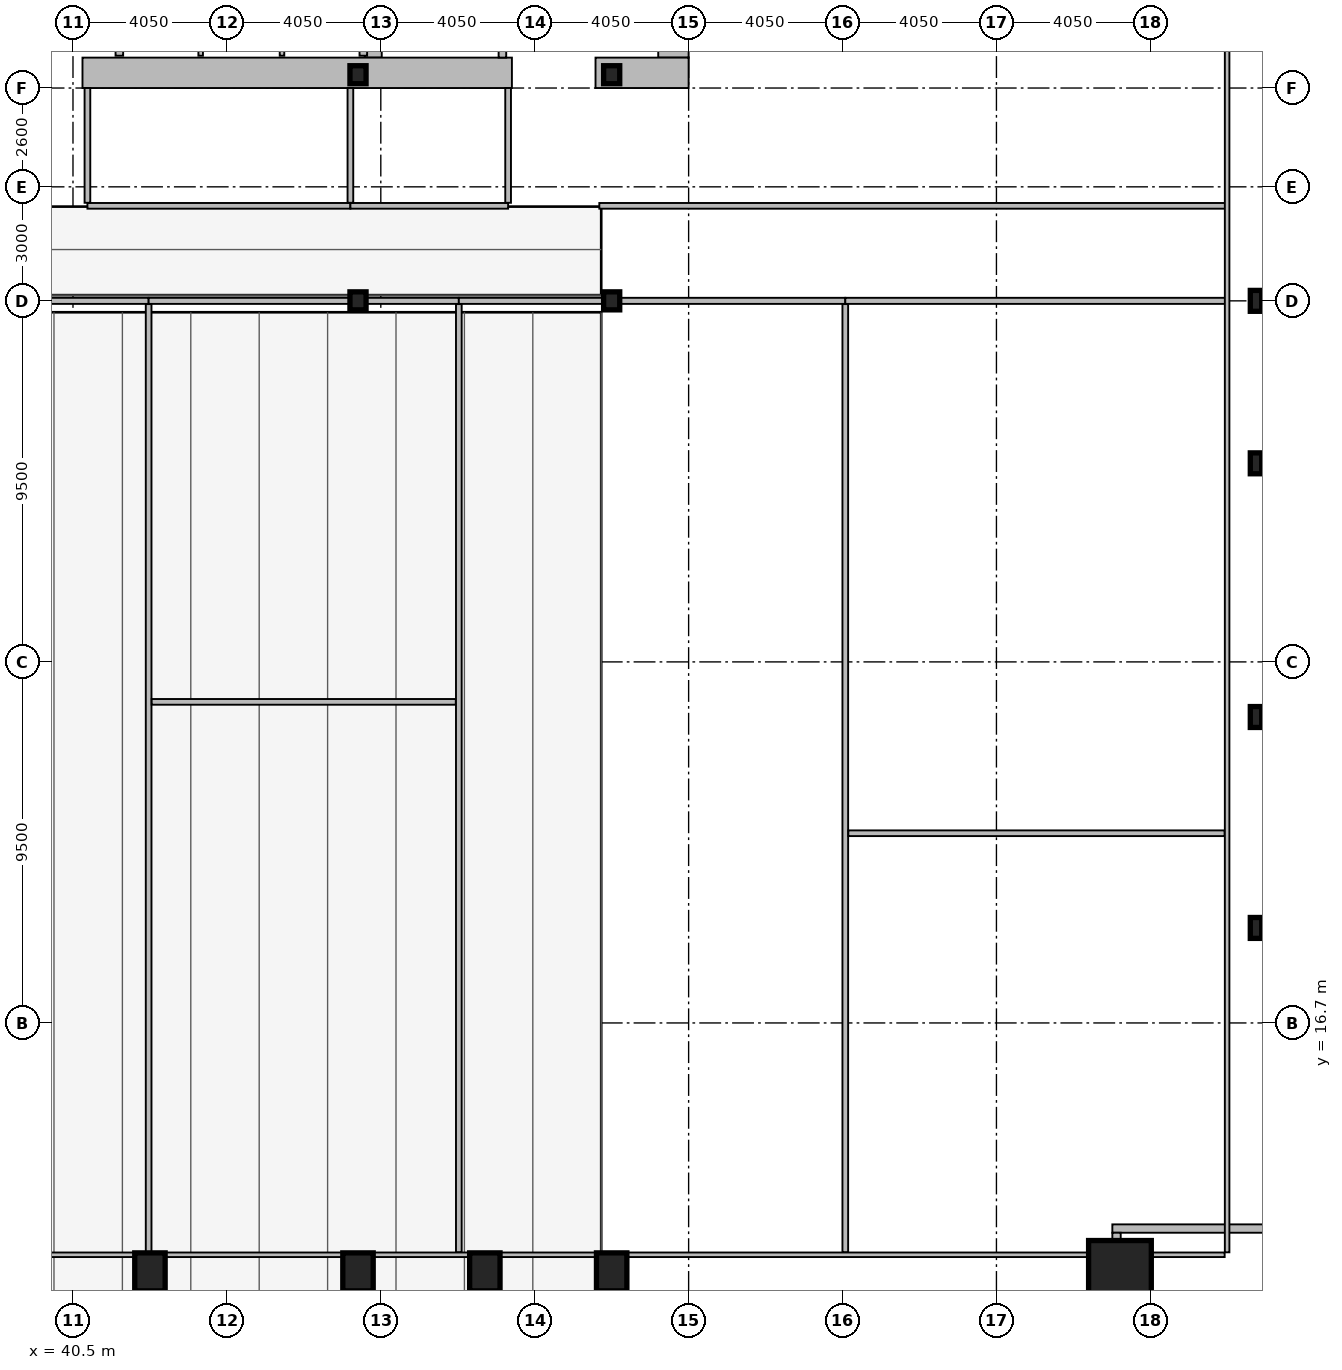
"""IFC4 building model, lengths in metres.
Left out: names, types, materials, properties, quantities, classifications, styles, units other than length and angle.
Written with IfcOpenShell. Run it as: python <this file> out.ifc"""

import sys

from ifc_helpers import new_model, si_unit, direction, frame, frame_2d, origin, origin_2d, place, context, subcontext, project, spatial, rectangle, hollow_rectangle, i_section, extrude, element, fill, save


model = new_model("IFC4")
c1 = context("Model", 3, precision=1e-05, world=origin(), true_north=direction((0.0, 1.0)))
c2 = subcontext(c1, "Body", "Model", "MODEL_VIEW")
j1 = project(units=[si_unit("LENGTHUNIT", "METRE"), si_unit("PLANEANGLEUNIT", "RADIAN")], contexts=[c1])
p1 = place(None, origin())
s1 = spatial("IfcSite", under=j1, at=p1, CompositionType="ELEMENT")
p2 = place(p1, origin())
s2 = spatial("IfcBuilding", under=s1, at=p2, CompositionType="ELEMENT")
p3 = place(p2, frame((0.0, 0.0, 61.8)))
s3 = spatial("IfcBuildingStorey", under=s2, at=p3, CompositionType="ELEMENT", Elevation=61.8)
p4 = place(p3, frame((56.3, 52.9, 0.0), z_axis=(0.0, 0.0, 1.0), x_axis=(0.0, -1.0, 0.0)))
e1 = element("IfcWall", 1, at=p4, inside=s3, PredefinedType="SHEAR", context=c2, shape_type="SweptSolid", body=[
    extrude(rectangle(XDim=10.8, YDim=0.8, at=frame_2d((5.4, 0.0))), origin(), (0.0, 0.0, 1.0), 3.82),
])
p5 = place(p3, frame((48.4, 42.1, 0.0), z_axis=(0.0, 0.0, 1.0), x_axis=(0.0, 1.0, 0.0)))
e2 = element("IfcWall", 2, at=p5, inside=s3, PredefinedType="SHEAR", context=c2, shape_type="SweptSolid", body=[
    extrude(rectangle(XDim=10.8, YDim=0.45, at=frame_2d((5.4, 0.0))), origin(), (0.0, 0.0, 1.0), 3.82),
])
p6 = place(p3, frame((52.05, 41.7, 0.0), z_axis=(0.0, 0.0, 1.0), x_axis=(-1.0, 0.0, 0.0)))
e3 = element("IfcWall", 3, at=p6, inside=s3, PredefinedType="SHEAR", context=c2, shape_type="SweptSolid", body=[
    extrude(rectangle(XDim=11.3, YDim=0.8, at=frame_2d((5.65, 0.0))), origin(), (0.0, 0.0, 1.0), 3.82),
])
p7 = place(p3, frame((56.7, 41.7, 0.0), z_axis=(0.0, 0.0, 1.0), x_axis=(-1.0, 0.0, 0.0)))
e4 = element("IfcWall", 4, at=p7, inside=s3, PredefinedType="SHEAR", context=c2, shape_type="SweptSolid", body=[
    extrude(rectangle(XDim=2.45, YDim=0.8, at=frame_2d((1.225, 0.0))), origin(), (0.0, 0.0, 1.0), 3.82),
])
p8 = place(p3, frame((68.05, 10.15, 0.0), z_axis=(0.0, 0.0, 1.0), x_axis=(1.0, 0.0, 0.0)))
e5 = element("IfcColumn", 5, at=p8, inside=s3, PredefinedType="COLUMN", context=c2, shape_type="SweptSolid", body=[
    extrude(hollow_rectangle(XDim=1.65, YDim=1.65, WallThickness=0.075, at=origin_2d()), origin(), (0.0, 0.0, 1.0), 4.0),
])
for number, where, z_axis, x_axis in (
    (6, (42.525, 10.15, 0.0), (0.0, 0.0, 1.0), (1.0, 0.0, 0.0)),
    (7, (48.0, 10.15, 0.0), (0.0, 0.0, 1.0), (1.0, 0.0, 0.0)),
    (8, (51.337, 10.15, 0.0), (0.0, 0.0, 1.0), (1.0, 0.0, 0.0)),
    (9, (54.675, 10.15, 0.0), (0.0, 0.0, 1.0), (1.0, 0.0, 0.0)),
):
    element("IfcColumn", number, at=place(p3, frame(where, z_axis=z_axis, x_axis=x_axis)), inside=s3, PredefinedType="COLUMN", context=c2, shape_type="SweptSolid", body=[
        extrude(hollow_rectangle(XDim=0.8, YDim=1.0, WallThickness=0.055, at=origin_2d()), origin(), (0.0, 0.0, 1.0), 4.0),
    ])
for number, where, z_axis, x_axis in (
    (10, (71.63, 19.2, 0.0), (0.0, 0.0, 1.0), (1.0, 0.0, 0.0)),
    (11, (71.63, 24.75, 0.0), (0.0, 0.0, 1.0), (1.0, 0.0, 0.0)),
    (12, (71.63, 31.425, 0.0), (0.0, 0.0, 1.0), (1.0, 0.0, 0.0)),
    (13, (71.63, 35.7, 0.0), (0.0, 0.0, 1.0), (1.0, 0.0, 0.0)),
):
    element("IfcColumn", number, at=place(p3, frame(where, z_axis=z_axis, x_axis=x_axis)), inside=s3, PredefinedType="COLUMN", context=c2, shape_type="SweptSolid", body=[
        extrude(i_section(OverallWidth=0.3, OverallDepth=0.55, WebThickness=0.015, FlangeThickness=0.029, at=origin_2d()), origin(), (0.0, 0.0, 1.0), 4.0),
    ])
for number, where, z_axis, x_axis in (
    (14, (48.0, 35.7, 0.0), (0.0, 0.0, 1.0), (1.0, 0.0, 0.0)),
    (15, (48.0, 41.65, 0.0), (0.0, 0.0, 1.0), (1.0, 0.0, 0.0)),
    (16, (54.675, 35.7, 0.0), (0.0, 0.0, 1.0), (1.0, 0.0, 0.0)),
    (17, (54.675, 41.65, 0.0), (0.0, 0.0, 1.0), (1.0, 0.0, 0.0)),
):
    element("IfcColumn", number, at=place(p3, frame(where, z_axis=z_axis, x_axis=x_axis)), inside=s3, PredefinedType="COLUMN", context=c2, shape_type="SweptSolid", body=[
        extrude(i_section(OverallWidth=0.424, OverallDepth=0.474, WebThickness=0.048, FlangeThickness=0.077, at=origin_2d()), origin(), (0.0, 0.0, 1.0), 4.0),
    ])
p9 = place(p3, frame((72.07, 11.29, 0.0), z_axis=(0.0, 0.0, 1.0), x_axis=(-1.0, 0.0, 0.0)))
e18 = element("IfcWall", 18, at=p9, inside=s3, PredefinedType="SOLIDWALL", context=c2, shape_type="SweptSolid", body=[
    extrude(rectangle(XDim=4.22, YDim=0.22, at=frame_2d((2.11, 0.0))), origin(), (0.0, 0.0, 1.0), 3.16),
])
p10 = place(p3, frame((67.96, 11.18, 0.0), z_axis=(0.0, 0.0, 1.0), x_axis=(0.0, -1.0, 0.0)))
e19 = element("IfcWall", 19, at=p10, inside=s3, PredefinedType="SOLIDWALL", context=c2, shape_type="SweptSolid", body=[
    extrude(rectangle(XDim=3.91, YDim=0.22, at=frame_2d((1.955, 0.0))), origin(), (0.0, 0.0, 1.0), 3.16),
])
p11 = place(p3, frame((51.8, 42.1, 0.0), z_axis=(0.0, 0.0, 1.0), x_axis=(0.0, 1.0, 0.0)))
e20 = element("IfcWall", 20, at=p11, inside=s3, PredefinedType="PARTITIONING", context=c2, shape_type="SweptSolid", body=[
    extrude(rectangle(XDim=2.395, YDim=0.2, at=frame_2d((1.198, 0.0))), origin(), (0.0, 0.0, 1.0), 3.82),
])
p12 = place(p11, frame((0.38, 0.0, 0.0)))
e21 = element("IfcOpeningElement", 21, at=p12, cuts=e20, PredefinedType="OPENING", context=c2, shape_type="SweptSolid", body=[
    extrude(rectangle(XDim=1.05, YDim=2.15, at=frame_2d((0.525, 1.075))), frame((0.0, 0.11, 0.0), z_axis=(0.0, -1.0, 0.0), x_axis=(1.0, 0.0, 0.0)), (0.0, 0.0, 1.0), 0.22),
])
for number, where, z_axis, x_axis in (
    (22, (41.72, 42.15, 0.0), (0.0, 0.0, 1.0), (0.0, 1.0, 0.0)),
    (23, (48.14, 42.15, 0.0), (0.0, 0.0, 1.0), (0.0, 1.0, 0.0)),
):
    element("IfcWall", number, at=place(p3, frame(where, z_axis=z_axis, x_axis=x_axis)), inside=s3, PredefinedType="PARTITIONING", context=c2, shape_type="SweptSolid", body=[
        extrude(rectangle(XDim=2.095, YDim=0.2, at=frame_2d((1.048, 0.0))), origin(), (0.0, 0.0, 1.0), 3.82),
    ])
for number, where, z_axis, x_axis in (
    (24, (43.86, 42.15, 0.0), (0.0, 0.0, 1.0), (0.0, 1.0, 0.0)),
    (25, (46.0, 42.15, 0.0), (0.0, 0.0, 1.0), (0.0, 1.0, 0.0)),
):
    element("IfcWall", number, at=place(p3, frame(where, z_axis=z_axis, x_axis=x_axis)), inside=s3, PredefinedType="PARTITIONING", context=c2, shape_type="SweptSolid", body=[
        extrude(rectangle(XDim=2.095, YDim=0.12, at=frame_2d((1.048, 0.0))), origin(), (0.0, 0.0, 1.0), 3.82),
    ])
p13 = place(p3, frame((40.88, 38.2, 0.0), z_axis=(0.0, 0.0, 1.0), x_axis=(1.0, 0.0, 0.0)))
e26 = element("IfcWall", 26, at=p13, inside=s3, PredefinedType="PARTITIONING", context=c2, shape_type="SweptSolid", body=[
    extrude(rectangle(XDim=6.92, YDim=0.15, at=frame_2d((3.46, 0.0))), origin(), (0.0, 0.0, 1.0), 3.01),
])
p14 = place(p13, frame((1.1, 0.0, 0.0)))
e27 = element("IfcOpeningElement", 27, at=p14, cuts=e26, PredefinedType="OPENING", context=c2, shape_type="SweptSolid", body=[
    extrude(rectangle(XDim=0.9, YDim=2.05, at=frame_2d((0.45, 1.025))), frame((0.0, 0.085, 0.0), z_axis=(0.0, -1.0, 0.0), x_axis=(1.0, 0.0, 0.0)), (0.0, 0.0, 1.0), 0.17),
])
p15 = place(p3, frame((47.8, 38.2, 0.0), z_axis=(0.0, 0.0, 1.0), x_axis=(1.0, 0.0, 0.0)))
e28 = element("IfcWall", 28, at=p15, inside=s3, PredefinedType="PARTITIONING", context=c2, shape_type="SweptSolid", body=[
    extrude(rectangle(XDim=4.15, YDim=0.15, at=frame_2d((2.075, 0.0))), origin(), (0.0, 0.0, 1.0), 3.01),
])
p16 = place(p15, frame((1.1, 0.0, 0.0)))
e29 = element("IfcOpeningElement", 29, at=p16, cuts=e28, PredefinedType="OPENING", context=c2, shape_type="SweptSolid", body=[
    extrude(rectangle(XDim=1.0, YDim=2.05, at=frame_2d((0.5, 1.025))), frame((0.0, 0.085, 0.0), z_axis=(0.0, -1.0, 0.0), x_axis=(1.0, 0.0, 0.0)), (0.0, 0.0, 1.0), 0.17),
])
p17 = place(p3, frame((40.88, 38.28, 0.0), z_axis=(0.0, 0.0, 1.0), x_axis=(0.0, 1.0, 0.0)))
e30 = element("IfcWall", 30, at=p17, inside=s3, PredefinedType="PARTITIONING", context=c2, shape_type="SweptSolid", body=[
    extrude(rectangle(XDim=3.02, YDim=0.15, at=frame_2d((1.51, 0.0))), origin(), (0.0, 0.0, 1.0), 3.82),
])
p18 = place(p3, frame((47.8, 38.28, 0.0), z_axis=(0.0, 0.0, 1.0), x_axis=(0.0, 1.0, 0.0)))
e31 = element("IfcWall", 31, at=p18, inside=s3, PredefinedType="PARTITIONING", context=c2, shape_type="SweptSolid", body=[
    extrude(rectangle(XDim=3.02, YDim=0.15, at=frame_2d((1.51, 0.0))), origin(), (0.0, 0.0, 1.0), 3.01),
])
p19 = place(p3, frame((51.95, 38.28, 0.0), z_axis=(0.0, 0.0, 1.0), x_axis=(0.0, 1.0, 0.0)))
e32 = element("IfcWall", 32, at=p19, inside=s3, PredefinedType="PARTITIONING", context=c2, shape_type="SweptSolid", body=[
    extrude(rectangle(XDim=3.02, YDim=0.15, at=frame_2d((1.51, 0.0))), origin(), (0.0, 0.0, 1.0), 3.82),
])
p20 = place(p3, frame((54.35, 38.2, 0.0), z_axis=(0.0, 0.0, 1.0), x_axis=(1.0, 0.0, 0.0)))
e33 = element("IfcWall", 33, at=p20, inside=s3, PredefinedType="PARTITIONING", context=c2, shape_type="SweptSolid", body=[
    extrude(rectangle(XDim=16.52, YDim=0.15, at=frame_2d((8.26, 0.0))), origin(), (0.0, 0.0, 1.0), 3.01),
])
p21 = place(p20, frame((3.25, 0.0, 0.0)))
e34 = element("IfcOpeningElement", 34, at=p21, cuts=e33, PredefinedType="OPENING", context=c2, shape_type="SweptSolid", body=[
    extrude(rectangle(XDim=0.95, YDim=2.05, at=frame_2d((0.475, 1.025))), frame((0.0, 0.085, 0.0), z_axis=(0.0, -1.0, 0.0), x_axis=(1.0, 0.0, 0.0)), (0.0, 0.0, 1.0), 0.17),
])
p22 = place(p3, frame((34.68, 35.7, 0.0), z_axis=(0.0, 0.0, 1.0), x_axis=(1.0, 0.0, 0.0)))
e35 = element("IfcWall", 35, at=p22, inside=s3, PredefinedType="PARTITIONING", context=c2, shape_type="SweptSolid", body=[
    extrude(rectangle(XDim=7.81, YDim=0.16, at=frame_2d((3.905, 0.0))), origin(), (0.0, 0.0, 1.0), 3.01),
])
p23 = place(p22, frame((3.53, 0.0, 0.0)))
e36 = element("IfcOpeningElement", 36, at=p23, cuts=e35, PredefinedType="OPENING", context=c2, shape_type="SweptSolid", body=[
    extrude(rectangle(XDim=1.0, YDim=2.05, at=frame_2d((0.5, 1.025))), frame((0.0, 0.09, 0.0), z_axis=(0.0, -1.0, 0.0), x_axis=(1.0, 0.0, 0.0)), (0.0, 0.0, 1.0), 0.18),
])
p24 = place(p3, frame((42.49, 35.7, 0.0), z_axis=(0.0, 0.0, 1.0), x_axis=(1.0, 0.0, 0.0)))
e37 = element("IfcWall", 37, at=p24, inside=s3, PredefinedType="PARTITIONING", context=c2, shape_type="SweptSolid", body=[
    extrude(rectangle(XDim=8.163, YDim=0.16, at=frame_2d((4.082, 0.0))), origin(), (0.0, 0.0, 1.0), 3.01),
])
p25 = place(p24, frame((3.678, 0.0, 0.0)))
e38 = element("IfcOpeningElement", 38, at=p25, cuts=e37, PredefinedType="OPENING", context=c2, shape_type="SweptSolid", body=[
    extrude(rectangle(XDim=1.0, YDim=2.05, at=frame_2d((0.5, 1.025))), frame((0.0, 0.09, 0.0), z_axis=(0.0, -1.0, 0.0), x_axis=(1.0, 0.0, 0.0)), (0.0, 0.0, 1.0), 0.18),
])
p26 = place(p3, frame((42.49, 10.665, 0.0), z_axis=(0.0, 0.0, 1.0), x_axis=(0.0, 1.0, 0.0)))
e39 = element("IfcWall", 39, at=p26, inside=s3, PredefinedType="PARTITIONING", context=c2, shape_type="SweptSolid", body=[
    extrude(rectangle(XDim=24.95, YDim=0.15, at=frame_2d((12.475, 0.0))), origin(), (0.0, 0.0, 1.0), 3.01),
])
p27 = place(p3, frame((42.571, 25.148, 0.0), z_axis=(0.0, 0.0, 1.0), x_axis=(1.0, 0.0, 0.0)))
e40 = element("IfcWall", 40, at=p27, inside=s3, PredefinedType="PARTITIONING", context=c2, shape_type="SweptSolid", body=[
    extrude(rectangle(XDim=8.003, YDim=0.15, at=frame_2d((4.001, 0.0))), origin(), (0.0, 0.0, 1.0), 3.01),
])
p28 = place(p27, frame((3.673, 0.0, 0.0)))
e41 = element("IfcOpeningElement", 41, at=p28, cuts=e40, PredefinedType="OPENING", context=c2, shape_type="SweptSolid", body=[
    extrude(rectangle(XDim=0.9, YDim=2.05, at=frame_2d((0.45, 1.025))), frame((0.0, 0.085, 0.0), z_axis=(0.0, -1.0, 0.0), x_axis=(1.0, 0.0, 0.0)), (0.0, 0.0, 1.0), 0.17),
])
p29 = place(p3, frame((50.653, 35.7, 0.0), z_axis=(0.0, 0.0, 1.0), x_axis=(1.0, 0.0, 0.0)))
e42 = element("IfcWall", 42, at=p29, inside=s3, PredefinedType="PARTITIONING", context=c2, shape_type="SweptSolid", body=[
    extrude(rectangle(XDim=10.169, YDim=0.16, at=frame_2d((5.084, 0.0))), origin(), (0.0, 0.0, 1.0), 3.01),
])
p30 = place(p29, frame((4.521, 0.0, 0.0)))
e43 = element("IfcOpeningElement", 43, at=p30, cuts=e42, PredefinedType="OPENING", context=c2, shape_type="SweptSolid", body=[
    extrude(rectangle(XDim=1.0, YDim=2.05, at=frame_2d((0.5, 1.025))), frame((0.0, 0.09, 0.0), z_axis=(0.0, -1.0, 0.0), x_axis=(1.0, 0.0, 0.0)), (0.0, 0.0, 1.0), 0.18),
])
p31 = place(p3, frame((50.653, 10.665, 0.0), z_axis=(0.0, 0.0, 1.0), x_axis=(0.0, 1.0, 0.0)))
e44 = element("IfcWall", 44, at=p31, inside=s3, PredefinedType="PARTITIONING", context=c2, shape_type="SweptSolid", body=[
    extrude(rectangle(XDim=24.95, YDim=0.15, at=frame_2d((12.475, 0.0))), origin(), (0.0, 0.0, 1.0), 3.21),
])
p32 = place(p3, frame((60.823, 35.7, 0.0), z_axis=(0.0, 0.0, 1.0), x_axis=(1.0, 0.0, 0.0)))
e45 = element("IfcWall", 45, at=p32, inside=s3, PredefinedType="PARTITIONING", context=c2, shape_type="SweptSolid", body=[
    extrude(rectangle(XDim=10.048, YDim=0.16, at=frame_2d((5.024, 0.0))), origin(), (0.0, 0.0, 1.0), 3.01),
])
p33 = place(p32, frame((4.47, 0.0, 0.0)))
e46 = element("IfcOpeningElement", 46, at=p33, cuts=e45, PredefinedType="OPENING", context=c2, shape_type="SweptSolid", body=[
    extrude(rectangle(XDim=1.0, YDim=2.05, at=frame_2d((0.5, 1.025))), frame((0.0, 0.09, 0.0), z_axis=(0.0, -1.0, 0.0), x_axis=(1.0, 0.0, 0.0)), (0.0, 0.0, 1.0), 0.18),
])
p34 = place(p3, frame((60.823, 10.665, 0.0), z_axis=(0.0, 0.0, 1.0), x_axis=(0.0, 1.0, 0.0)))
e47 = element("IfcWall", 47, at=p34, inside=s3, PredefinedType="PARTITIONING", context=c2, shape_type="SweptSolid", body=[
    extrude(rectangle(XDim=24.95, YDim=0.15, at=frame_2d((12.475, 0.0))), origin(), (0.0, 0.0, 1.0), 3.01),
])
p35 = place(p3, frame((60.903, 21.692, 0.0), z_axis=(0.0, 0.0, 1.0), x_axis=(1.0, 0.0, 0.0)))
e48 = element("IfcWall", 48, at=p35, inside=s3, PredefinedType="PARTITIONING", context=c2, shape_type="SweptSolid", body=[
    extrude(rectangle(XDim=9.902, YDim=0.15, at=frame_2d((4.951, 0.0))), origin(), (0.0, 0.0, 1.0), 3.82),
])
p36 = place(p35, frame((4.521, 0.0, 0.0)))
e49 = element("IfcOpeningElement", 49, at=p36, cuts=e48, PredefinedType="OPENING", context=c2, shape_type="SweptSolid", body=[
    extrude(rectangle(XDim=0.9, YDim=2.05, at=frame_2d((0.45, 1.025))), frame((0.0, 0.085, 0.0), z_axis=(0.0, -1.0, 0.0), x_axis=(1.0, 0.0, 0.0)), (0.0, 0.0, 1.0), 0.17),
])
p37 = place(p3, frame((70.87, 10.665, 0.0), z_axis=(0.0, 0.0, 1.0), x_axis=(0.0, 1.0, 0.0)))
e50 = element("IfcWall", 50, at=p37, inside=s3, PredefinedType="PARTITIONING", context=c2, shape_type="SweptSolid", body=[
    extrude(rectangle(XDim=42.11, YDim=0.12, at=frame_2d((21.055, 0.0))), origin(), (0.0, 0.0, 1.0), 3.01),
])
p38 = place(p3, frame((2.095, 10.6, 0.0), z_axis=(0.0, 0.0, 1.0), x_axis=(1.0, 0.0, 0.0)))
e51 = element("IfcWall", 51, at=p38, inside=s3, PredefinedType="PARTITIONING", context=c2, shape_type="SweptSolid", body=[
    extrude(rectangle(XDim=68.71, YDim=0.12, at=frame_2d((34.355, 0.0))), origin(), (0.0, 0.0, 1.0), 3.01),
])
p39 = place(p14, origin())
e52 = element("IfcDoor", 52, at=p39, inside=s3, OperationType="SINGLE_SWING_LEFT", PredefinedType="DOOR", context=c2, shape_type="SweptSolid", body=[
    extrude(rectangle(XDim=0.9, YDim=2.05, at=frame_2d((0.45, 1.025))), frame((0.0, 0.025, 0.0), z_axis=(0.0, -1.0, 0.0), x_axis=(1.0, 0.0, 0.0)), (0.0, 0.0, 1.0), 0.05),
])
fill(e27, e52)
p40 = place(p16, origin())
e53 = element("IfcDoor", 53, at=p40, inside=s3, OperationType="SINGLE_SWING_RIGHT", PredefinedType="DOOR", context=c2, shape_type="SweptSolid", body=[
    extrude(rectangle(XDim=1.0, YDim=2.05, at=frame_2d((0.5, 1.025))), frame((0.0, 0.025, 0.0), z_axis=(0.0, -1.0, 0.0), x_axis=(1.0, 0.0, 0.0)), (0.0, 0.0, 1.0), 0.05),
])
fill(e29, e53)
p41 = place(p21, origin())
e54 = element("IfcDoor", 54, at=p41, inside=s3, OperationType="SINGLE_SWING_RIGHT", PredefinedType="DOOR", context=c2, shape_type="SweptSolid", body=[
    extrude(rectangle(XDim=0.95, YDim=2.05, at=frame_2d((0.475, 1.025))), frame((0.0, 0.025, 0.0), z_axis=(0.0, -1.0, 0.0), x_axis=(1.0, 0.0, 0.0)), (0.0, 0.0, 1.0), 0.05),
])
fill(e34, e54)
p42 = place(p25, origin())
e55 = element("IfcDoor", 55, at=p42, inside=s3, OperationType="SINGLE_SWING_LEFT", PredefinedType="DOOR", context=c2, shape_type="SweptSolid", body=[
    extrude(rectangle(XDim=1.0, YDim=2.05, at=frame_2d((0.5, 1.025))), frame((0.0, 0.025, 0.0), z_axis=(0.0, -1.0, 0.0), x_axis=(1.0, 0.0, 0.0)), (0.0, 0.0, 1.0), 0.05),
])
fill(e38, e55)
p43 = place(p28, origin())
e56 = element("IfcDoor", 56, at=p43, inside=s3, OperationType="SINGLE_SWING_RIGHT", PredefinedType="DOOR", context=c2, shape_type="SweptSolid", body=[
    extrude(rectangle(XDim=0.9, YDim=2.05, at=frame_2d((0.45, 1.025))), frame((0.0, 0.025, 0.0), z_axis=(0.0, -1.0, 0.0), x_axis=(1.0, 0.0, 0.0)), (0.0, 0.0, 1.0), 0.05),
])
fill(e41, e56)
p44 = place(p30, origin())
e57 = element("IfcDoor", 57, at=p44, inside=s3, OperationType="SINGLE_SWING_LEFT", PredefinedType="DOOR", context=c2, shape_type="SweptSolid", body=[
    extrude(rectangle(XDim=1.0, YDim=2.05, at=frame_2d((0.5, 1.025))), frame((0.0, 0.025, 0.0), z_axis=(0.0, -1.0, 0.0), x_axis=(1.0, 0.0, 0.0)), (0.0, 0.0, 1.0), 0.05),
])
fill(e43, e57)
p45 = place(p33, origin())
e58 = element("IfcDoor", 58, at=p45, inside=s3, OperationType="SINGLE_SWING_RIGHT", PredefinedType="DOOR", context=c2, shape_type="SweptSolid", body=[
    extrude(rectangle(XDim=1.0, YDim=2.05, at=frame_2d((0.5, 1.025))), frame((0.0, 0.025, 0.0), z_axis=(0.0, -1.0, 0.0), x_axis=(1.0, 0.0, 0.0)), (0.0, 0.0, 1.0), 0.05),
])
fill(e46, e58)
p46 = place(p36, origin())
e59 = element("IfcDoor", 59, at=p46, inside=s3, OperationType="SINGLE_SWING_LEFT", PredefinedType="DOOR", context=c2, shape_type="SweptSolid", body=[
    extrude(rectangle(XDim=0.9, YDim=2.05, at=frame_2d((0.45, 1.025))), frame((0.0, 0.025, 0.0), z_axis=(0.0, -1.0, 0.0), x_axis=(1.0, 0.0, 0.0)), (0.0, 0.0, 1.0), 0.05),
])
fill(e49, e59)
save(model, sys.argv[1])
